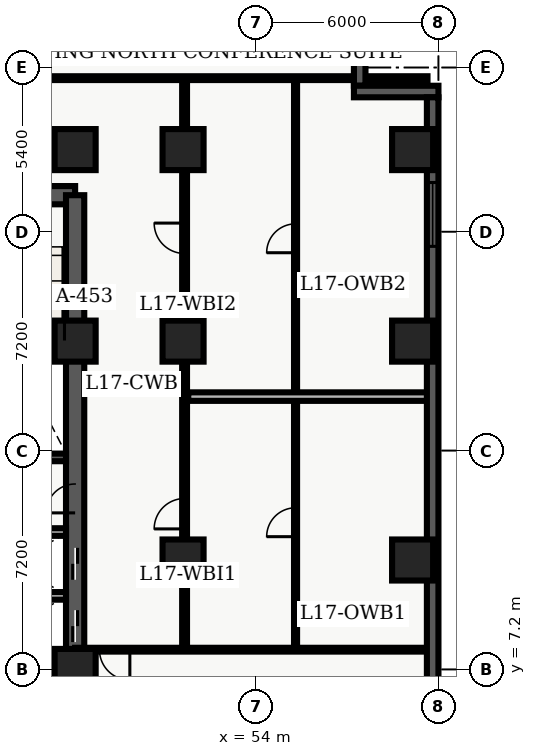
"""IFC4 building model, lengths in metres.
Left out: names, types, materials, properties, quantities, classifications, styles, units other than length and angle.
Written with IfcOpenShell. Run it as: python <this file> out.ifc"""

import sys

from ifc_helpers import new_model, entity, si_unit, converted_unit, direction, frame, origin_with_axes, origin_2d_with_axis, place, context, subcontext, project, spatial, polyline, rectangle, outline, extrude, element, fill, save


model = new_model("IFC4")
c1 = context("Model", 3, precision=1e-05, world=origin_with_axes(), true_north=direction((0.0, 1.0)))
c2 = subcontext(c1, "Body", "Model", "MODEL_VIEW")
j1 = project(units=[si_unit("LENGTHUNIT", "METRE"), converted_unit("PLANEANGLEUNIT", "DEGREE", entity("IfcPlaneAngleMeasure", 0.017), si_unit("PLANEANGLEUNIT", "RADIAN"), dimensions=[0, 0, 0, 0, 0, 0, 0])], contexts=[c1])
p1 = place(None, origin_with_axes())
s1 = spatial("IfcSite", under=j1, at=p1, CompositionType="ELEMENT")
p2 = place(p1, origin_with_axes())
s2 = spatial("IfcBuilding", under=s1, at=p2, CompositionType="ELEMENT")
p3 = place(p2, frame((0.0, 0.0, 71.7), z_axis=(0.0, 0.0, 1.0), x_axis=(1.0, 0.0, 0.0)))
s3 = spatial("IfcBuildingStorey", under=s2, at=p3, CompositionType="ELEMENT", Elevation=71.7)
p4 = place(p3, frame((40.2, 7.2, 0.0), z_axis=(0.0, 0.0, 1.0), x_axis=(1.0, 0.0, 0.0)))
e1 = element("IfcWall", 1, at=p4, inside=s3, PredefinedType="SHEAR", context=c2, shape_type="SweptSolid", body=[
    extrude(outline(polyline([(0.0, -0.3), (7.85, -0.3), (7.85, 0.3), (0.0, 0.3), (0.0, -0.3)])), origin_with_axes(), (0.0, 0.0, 1.0), 3.66),
])
p5 = place(p4, frame((2.175, 0.0, 0.0), z_axis=(0.0, 0.0, 1.0), x_axis=(1.0, 0.0, 0.0)))
e2 = element("IfcOpeningElement", 2, at=p5, cuts=e1, PredefinedType="OPENING", context=c2, shape_type="SweptSolid", body=[
    extrude(rectangle(XDim=1.05, YDim=0.62, at=origin_2d_with_axis()), origin_with_axes(), (0.0, 0.0, 1.0), 2.15),
])
p6 = place(p3, frame((40.2, 22.8, 0.0), z_axis=(0.0, 0.0, 1.0), x_axis=(1.0, 0.0, 0.0)))
e3 = element("IfcWall", 3, at=p6, inside=s3, PredefinedType="SHEAR", context=c2, shape_type="SweptSolid", body=[
    extrude(outline(polyline([(0.0, -0.3), (7.85, -0.3), (7.85, 0.3), (0.0, 0.3), (0.0, -0.3)])), origin_with_axes(), (0.0, 0.0, 1.0), 3.66),
])
p7 = place(p6, frame((5.775, 0.0, 0.0), z_axis=(0.0, 0.0, 1.0), x_axis=(1.0, 0.0, 0.0)))
e4 = element("IfcOpeningElement", 4, at=p7, cuts=e3, PredefinedType="OPENING", context=c2, shape_type="SweptSolid", body=[
    extrude(rectangle(XDim=1.05, YDim=0.62, at=origin_2d_with_axis()), origin_with_axes(), (0.0, 0.0, 1.0), 2.15),
])
p8 = place(p6, frame((2.15, 0.0, 0.0), z_axis=(0.0, 0.0, 1.0), x_axis=(1.0, 0.0, 0.0)))
e5 = element("IfcOpeningElement", 5, at=p8, cuts=e3, PredefinedType="OPENING", context=c2, shape_type="SweptSolid", body=[
    extrude(rectangle(XDim=0.9, YDim=0.62, at=origin_2d_with_axis()), origin_with_axes(), (0.0, 0.0, 1.0), 2.15),
])
p9 = place(p3, frame((48.05, 7.2, 0.0), z_axis=(0.0, 0.0, 1.0), x_axis=(0.0, 1.0, 0.0)))
e6 = element("IfcWall", 6, at=p9, inside=s3, PredefinedType="SHEAR", context=c2, shape_type="SweptSolid", body=[
    extrude(outline(polyline([(0.0, -0.3), (15.6, -0.3), (15.6, 0.3), (0.0, 0.3), (0.0, -0.3)])), origin_with_axes(), (0.0, 0.0, 1.0), 3.66),
])
p10 = place(p9, frame((1.425, 0.0, 0.0), z_axis=(0.0, 0.0, 1.0), x_axis=(1.0, 0.0, 0.0)))
e7 = element("IfcOpeningElement", 7, at=p10, cuts=e6, PredefinedType="OPENING", context=c2, shape_type="SweptSolid", body=[
    extrude(rectangle(XDim=1.05, YDim=0.62, at=origin_2d_with_axis()), origin_with_axes(), (0.0, 0.0, 1.0), 2.15),
])
p11 = place(p9, frame((3.475, 0.0, 0.0), z_axis=(0.0, 0.0, 1.0), x_axis=(1.0, 0.0, 0.0)))
e8 = element("IfcOpeningElement", 8, at=p11, cuts=e6, PredefinedType="OPENING", context=c2, shape_type="SweptSolid", body=[
    extrude(rectangle(XDim=1.05, YDim=0.62, at=origin_2d_with_axis()), origin_with_axes(), (0.0, 0.0, 1.0), 2.15),
])
p12 = place(p9, frame((5.625, 0.0, 0.0), z_axis=(0.0, 0.0, 1.0), x_axis=(1.0, 0.0, 0.0)))
e9 = element("IfcOpeningElement", 9, at=p12, cuts=e6, PredefinedType="OPENING", context=c2, shape_type="SweptSolid", body=[
    extrude(rectangle(XDim=0.95, YDim=0.62, at=origin_2d_with_axis()), origin_with_axes(), (0.0, 0.0, 1.0), 2.15),
])
p13 = place(p3, frame((44.25, 14.175, 0.0), z_axis=(0.0, 0.0, 1.0), x_axis=(1.0, 0.0, 0.0)))
e10 = element("IfcWall", 10, at=p13, inside=s3, PredefinedType="SHEAR", context=c2, shape_type="SweptSolid", body=[
    extrude(outline(polyline([(0.0, -0.125), (3.5, -0.125), (3.5, 0.125), (0.0, 0.125), (0.0, -0.125)])), origin_with_axes(), (0.0, 0.0, 1.0), 3.66),
])
for number, where, z_axis, x_axis in (
    (11, (48.05, 7.2, 0.0), (0.0, 0.0, 1.0), (1.0, 0.0, 0.0)),
    (12, (48.05, 18.0, 0.0), (0.0, 0.0, 1.0), (1.0, 0.0, 0.0)),
    (13, (48.05, 24.3, 0.0), (0.0, 0.0, 1.0), (1.0, 0.0, 0.0)),
    (14, (51.6, 10.8, 0.0), (0.0, 0.0, 1.0), (1.0, 0.0, 0.0)),
    (15, (51.6, 18.0, 0.0), (0.0, 0.0, 1.0), (1.0, 0.0, 0.0)),
    (16, (51.6, 24.3, 0.0), (0.0, 0.0, 1.0), (1.0, 0.0, 0.0)),
    (17, (59.15, 10.8, 0.0), (0.0, 0.0, 1.0), (1.0, 0.0, 0.0)),
    (18, (59.15, 18.0, 0.0), (0.0, 0.0, 1.0), (1.0, 0.0, 0.0)),
    (19, (59.15, 24.3, 0.0), (0.0, 0.0, 1.0), (1.0, 0.0, 0.0)),
):
    element("IfcColumn", number, at=place(p3, frame(where, z_axis=z_axis, x_axis=x_axis)), inside=s3, PredefinedType="COLUMN", context=c2, shape_type="SweptSolid", body=[
        extrude(rectangle(XDim=1.35, YDim=1.35, at=origin_2d_with_axis()), origin_with_axes(), (0.0, 0.0, 1.0), 3.9),
    ])
for number, where, z_axis, x_axis in (
    (20, (44.25, 9.62, 0.0), (0.0, 0.0, 1.0), (1.0, 0.0, 0.0)),
    (21, (44.25, 11.72, 0.0), (0.0, 0.0, 1.0), (1.0, 0.0, 0.0)),
):
    element("IfcWall", number, at=place(p3, frame(where, z_axis=z_axis, x_axis=x_axis)), inside=s3, PredefinedType="SOLIDWALL", context=c2, shape_type="SweptSolid", body=[
        extrude(outline(polyline([(0.0, -0.125), (3.5, -0.125), (3.5, 0.125), (0.0, 0.125), (0.0, -0.125)])), origin_with_axes(), (0.0, 0.0, 1.0), 2.7),
    ])
p14 = place(p3, frame((51.65, 7.85, 0.0), z_axis=(0.0, 0.0, 1.0), x_axis=(0.0, 1.0, 0.0)))
e22 = element("IfcWall", 22, at=p14, inside=s3, PredefinedType="PARTITIONING", context=c2, shape_type="SweptSolid", body=[
    extrude(outline(polyline([(0.0, -0.08), (18.8, -0.08), (18.8, 0.08), (0.0, 0.08), (0.0, -0.08)])), origin_with_axes(), (0.0, 0.0, 1.0), 2.7),
])
p15 = place(p14, frame((4.473, 0.0, 0.0), z_axis=(0.0, 0.0, 1.0), x_axis=(1.0, 0.0, 0.0)))
e23 = element("IfcOpeningElement", 23, at=p15, cuts=e22, PredefinedType="OPENING", context=c2, shape_type="SweptSolid", body=[
    extrude(rectangle(XDim=1.0, YDim=0.18, at=origin_2d_with_axis()), origin_with_axes(), (0.0, 0.0, 1.0), 2.15),
])
p16 = place(p14, frame((13.533, 0.0, 0.0), z_axis=(0.0, 0.0, 1.0), x_axis=(1.0, 0.0, 0.0)))
e24 = element("IfcOpeningElement", 24, at=p16, cuts=e22, PredefinedType="OPENING", context=c2, shape_type="SweptSolid", body=[
    extrude(rectangle(XDim=1.0, YDim=0.18, at=origin_2d_with_axis()), origin_with_axes(), (0.0, 0.0, 1.0), 2.15),
])
p17 = place(p3, frame((59.64, 7.85, 0.0), z_axis=(0.0, 0.0, 1.0), x_axis=(-1.0, 0.0, 0.0)))
e25 = element("IfcWall", 25, at=p17, inside=s3, PredefinedType="PARTITIONING", context=c2, shape_type="SweptSolid", body=[
    extrude(outline(polyline([(0.0, -0.062), (11.59, -0.062), (11.59, 0.062), (0.0, 0.062), (0.0, -0.062)])), origin_with_axes(), (0.0, 0.0, 1.0), 2.7),
])
p18 = place(p17, frame((10.29, 0.0, 0.0), z_axis=(0.0, 0.0, 1.0), x_axis=(1.0, 0.0, 0.0)))
e26 = element("IfcOpeningElement", 26, at=p18, cuts=e25, PredefinedType="OPENING", context=c2, shape_type="SweptSolid", body=[
    extrude(rectangle(XDim=1.0, YDim=0.145, at=origin_2d_with_axis()), origin_with_axes(), (0.0, 0.0, 1.0), 2.15),
])
p19 = place(p3, frame((38.76, 26.65, 0.0), z_axis=(0.0, 0.0, 1.0), x_axis=(1.0, 0.0, 0.0)))
e27 = element("IfcWall", 27, at=p19, inside=s3, PredefinedType="PARTITIONING", context=c2, shape_type="SweptSolid", body=[
    extrude(outline(polyline([(0.0, -0.062), (20.88, -0.062), (20.88, 0.062), (0.0, 0.062), (0.0, -0.062)])), origin_with_axes(), (0.0, 0.0, 1.0), 2.7),
])
p20 = place(p19, frame((4.24, 0.0, 0.0), z_axis=(0.0, 0.0, 1.0), x_axis=(1.0, 0.0, 0.0)))
e28 = element("IfcOpeningElement", 28, at=p20, cuts=e27, PredefinedType="OPENING", context=c2, shape_type="SweptSolid", body=[
    extrude(rectangle(XDim=1.0, YDim=0.145, at=origin_2d_with_axis()), origin_with_axes(), (0.0, 0.0, 1.0), 2.15),
])
p21 = place(p3, frame((55.3, 7.98, 0.0), z_axis=(0.0, 0.0, 1.0), x_axis=(0.0, 1.0, 0.0)))
e29 = element("IfcWall", 29, at=p21, inside=s3, PredefinedType="PARTITIONING", context=c2, shape_type="SweptSolid", body=[
    extrude(outline(polyline([(0.0, -0.05), (18.54, -0.05), (18.54, 0.05), (0.0, 0.05), (0.0, -0.05)])), origin_with_axes(), (0.0, 0.0, 1.0), 2.7),
])
p22 = place(p21, frame((4.062, 0.0, 0.0), z_axis=(0.0, 0.0, 1.0), x_axis=(1.0, 0.0, 0.0)))
e30 = element("IfcOpeningElement", 30, at=p22, cuts=e29, PredefinedType="OPENING", context=c2, shape_type="SweptSolid", body=[
    extrude(rectangle(XDim=0.95, YDim=0.12, at=origin_2d_with_axis()), origin_with_axes(), (0.0, 0.0, 1.0), 2.15),
])
p23 = place(p21, frame((13.402, 0.0, 0.0), z_axis=(0.0, 0.0, 1.0), x_axis=(1.0, 0.0, 0.0)))
e31 = element("IfcOpeningElement", 31, at=p23, cuts=e29, PredefinedType="OPENING", context=c2, shape_type="SweptSolid", body=[
    extrude(rectangle(XDim=0.95, YDim=0.12, at=origin_2d_with_axis()), origin_with_axes(), (0.0, 0.0, 1.0), 2.15),
])
p24 = place(p3, frame((51.77, 16.175, 0.0), z_axis=(0.0, 0.0, 1.0), x_axis=(1.0, 0.0, 0.0)))
e32 = element("IfcWall", 32, at=p24, inside=s3, PredefinedType="PARTITIONING", context=c2, shape_type="SweptSolid", body=[
    extrude(outline(polyline([(0.0, -0.14), (7.855, -0.14), (7.855, 0.14), (0.0, 0.14), (0.0, -0.14)])), origin_with_axes(), (0.0, 0.0, 1.0), 2.7),
])
p25 = place(p3, frame((57.41, 28.42, 0.0), z_axis=(0.0, 0.0, 1.0), x_axis=(0.0, -1.0, 0.0)))
e33 = element("IfcWall", 33, at=p25, inside=s3, PredefinedType="SOLIDWALL", context=c2, shape_type="SweptSolid", body=[
    extrude(outline(polyline([(0.0, -0.19), (2.02, -0.19), (2.02, 0.19), (0.0, 0.19), (0.0, -0.19)])), origin_with_axes(), (0.0, 0.0, 1.0), 3.66),
])
p26 = place(p3, frame((57.22, 26.21, 0.0), z_axis=(0.0, 0.0, 1.0), x_axis=(1.0, 0.0, 0.0)))
e34 = element("IfcWall", 34, at=p26, inside=s3, PredefinedType="SOLIDWALL", context=c2, shape_type="SweptSolid", body=[
    extrude(outline(polyline([(0.0, -0.19), (2.78, -0.19), (2.78, 0.19), (0.0, 0.19), (0.0, -0.19)])), origin_with_axes(), (0.0, 0.0, 1.0), 3.66),
])
p27 = place(p3, frame((59.81, 26.02, 0.0), z_axis=(0.0, 0.0, 1.0), x_axis=(0.0, -1.0, 0.0)))
e35 = element("IfcWall", 35, at=p27, inside=s3, PredefinedType="SOLIDWALL", context=c2, shape_type="SweptSolid", body=[
    extrude(outline(polyline([(0.0, -0.19), (23.62, -0.19), (23.62, 0.19), (0.0, 0.19), (0.0, -0.19)])), origin_with_axes(), (0.0, 0.0, 1.0), 3.66),
])
p28 = place(p27, frame((3.853, 0.0, 0.45), z_axis=(0.0, 0.0, 1.0), x_axis=(1.0, 0.0, 0.0)))
e36 = element("IfcOpeningElement", 36, at=p28, cuts=e35, PredefinedType="OPENING", context=c2, shape_type="SweptSolid", body=[
    extrude(rectangle(XDim=2.1, YDim=0.4, at=origin_2d_with_axis()), origin_with_axes(), (0.0, 0.0, 1.0), 2.2),
])
p29 = place(p27, frame((20.218, 0.0, 0.45), z_axis=(0.0, 0.0, 1.0), x_axis=(1.0, 0.0, 0.0)))
e37 = element("IfcOpeningElement", 37, at=p29, cuts=e35, PredefinedType="OPENING", context=c2, shape_type="SweptSolid", body=[
    extrude(rectangle(XDim=2.1, YDim=0.4, at=origin_2d_with_axis()), origin_with_axes(), (0.0, 0.0, 1.0), 2.2),
])
p30 = place(p9, frame((1.425, 0.0, 0.0), z_axis=(0.0, 0.0, 1.0), x_axis=(1.0, 0.0, 0.0)))
e38 = element("IfcDoor", 38, at=p30, inside=s3, OperationType="SLIDING_TO_LEFT", PredefinedType="DOOR", context=c2, shape_type="SweptSolid", body=[
    extrude(rectangle(XDim=1.05, YDim=0.09, at=origin_2d_with_axis()), origin_with_axes(), (0.0, 0.0, 1.0), 2.15),
])
fill(e7, e38)
p31 = place(p9, frame((3.475, 0.0, 0.0), z_axis=(0.0, 0.0, 1.0), x_axis=(1.0, 0.0, 0.0)))
e39 = element("IfcDoor", 39, at=p31, inside=s3, OperationType="SLIDING_TO_RIGHT", PredefinedType="DOOR", context=c2, shape_type="SweptSolid", body=[
    extrude(rectangle(XDim=1.05, YDim=0.09, at=origin_2d_with_axis()), origin_with_axes(), (0.0, 0.0, 1.0), 2.15),
])
fill(e8, e39)
p32 = place(p9, frame((5.625, 0.0, 0.0), z_axis=(0.0, 0.0, 1.0), x_axis=(1.0, 0.0, 0.0)))
e40 = element("IfcDoor", 40, at=p32, inside=s3, OperationType="SINGLE_SWING_LEFT", PredefinedType="DOOR", context=c2, shape_type="SweptSolid", body=[
    extrude(rectangle(XDim=0.95, YDim=0.09, at=origin_2d_with_axis()), origin_with_axes(), (0.0, 0.0, 1.0), 2.15),
])
fill(e9, e40)
p33 = place(p17, frame((10.29, 0.0, 0.0), z_axis=(0.0, 0.0, 1.0), x_axis=(1.0, 0.0, 0.0)))
e41 = element("IfcDoor", 41, at=p33, inside=s3, OperationType="SINGLE_SWING_LEFT", PredefinedType="DOOR", context=c2, shape_type="SweptSolid", body=[
    extrude(rectangle(XDim=1.0, YDim=0.075, at=origin_2d_with_axis()), origin_with_axes(), (0.0, 0.0, 1.0), 2.15),
])
fill(e26, e41)
p34 = place(p21, frame((4.062, 0.0, 0.0), z_axis=(0.0, 0.0, 1.0), x_axis=(1.0, 0.0, 0.0)))
e42 = element("IfcDoor", 42, at=p34, inside=s3, OperationType="SINGLE_SWING_LEFT", PredefinedType="DOOR", context=c2, shape_type="SweptSolid", body=[
    extrude(rectangle(XDim=0.95, YDim=0.06, at=origin_2d_with_axis()), origin_with_axes(), (0.0, 0.0, 1.0), 2.15),
])
fill(e30, e42)
p35 = place(p14, frame((4.473, 0.0, 0.0), z_axis=(0.0, 0.0, 1.0), x_axis=(1.0, 0.0, 0.0)))
e43 = element("IfcDoor", 43, at=p35, inside=s3, OperationType="SINGLE_SWING_LEFT", PredefinedType="DOOR", context=c2, shape_type="SweptSolid", body=[
    extrude(rectangle(XDim=1.0, YDim=0.09, at=origin_2d_with_axis()), origin_with_axes(), (0.0, 0.0, 1.0), 2.15),
])
fill(e23, e43)
p36 = place(p21, frame((13.402, 0.0, 0.0), z_axis=(0.0, 0.0, 1.0), x_axis=(1.0, 0.0, 0.0)))
e44 = element("IfcDoor", 44, at=p36, inside=s3, OperationType="SINGLE_SWING_LEFT", PredefinedType="DOOR", context=c2, shape_type="SweptSolid", body=[
    extrude(rectangle(XDim=0.95, YDim=0.06, at=origin_2d_with_axis()), origin_with_axes(), (0.0, 0.0, 1.0), 2.15),
])
fill(e31, e44)
p37 = place(p14, frame((13.533, 0.0, 0.0), z_axis=(0.0, 0.0, 1.0), x_axis=(1.0, 0.0, 0.0)))
e45 = element("IfcDoor", 45, at=p37, inside=s3, OperationType="SINGLE_SWING_RIGHT", PredefinedType="DOOR", context=c2, shape_type="SweptSolid", body=[
    extrude(rectangle(XDim=1.0, YDim=0.09, at=origin_2d_with_axis()), origin_with_axes(), (0.0, 0.0, 1.0), 2.15),
])
fill(e24, e45)
p38 = place(p27, frame((3.853, 0.0, 0.45), z_axis=(0.0, 0.0, 1.0), x_axis=(1.0, 0.0, 0.0)))
e46 = element("IfcWindow", 46, at=p38, inside=s3, PredefinedType="WINDOW", context=c2, shape_type="SweptSolid", body=[
    extrude(rectangle(XDim=2.1, YDim=0.09, at=origin_2d_with_axis()), origin_with_axes(), (0.0, 0.0, 1.0), 2.2),
])
fill(e36, e46)
save(model, sys.argv[1])
